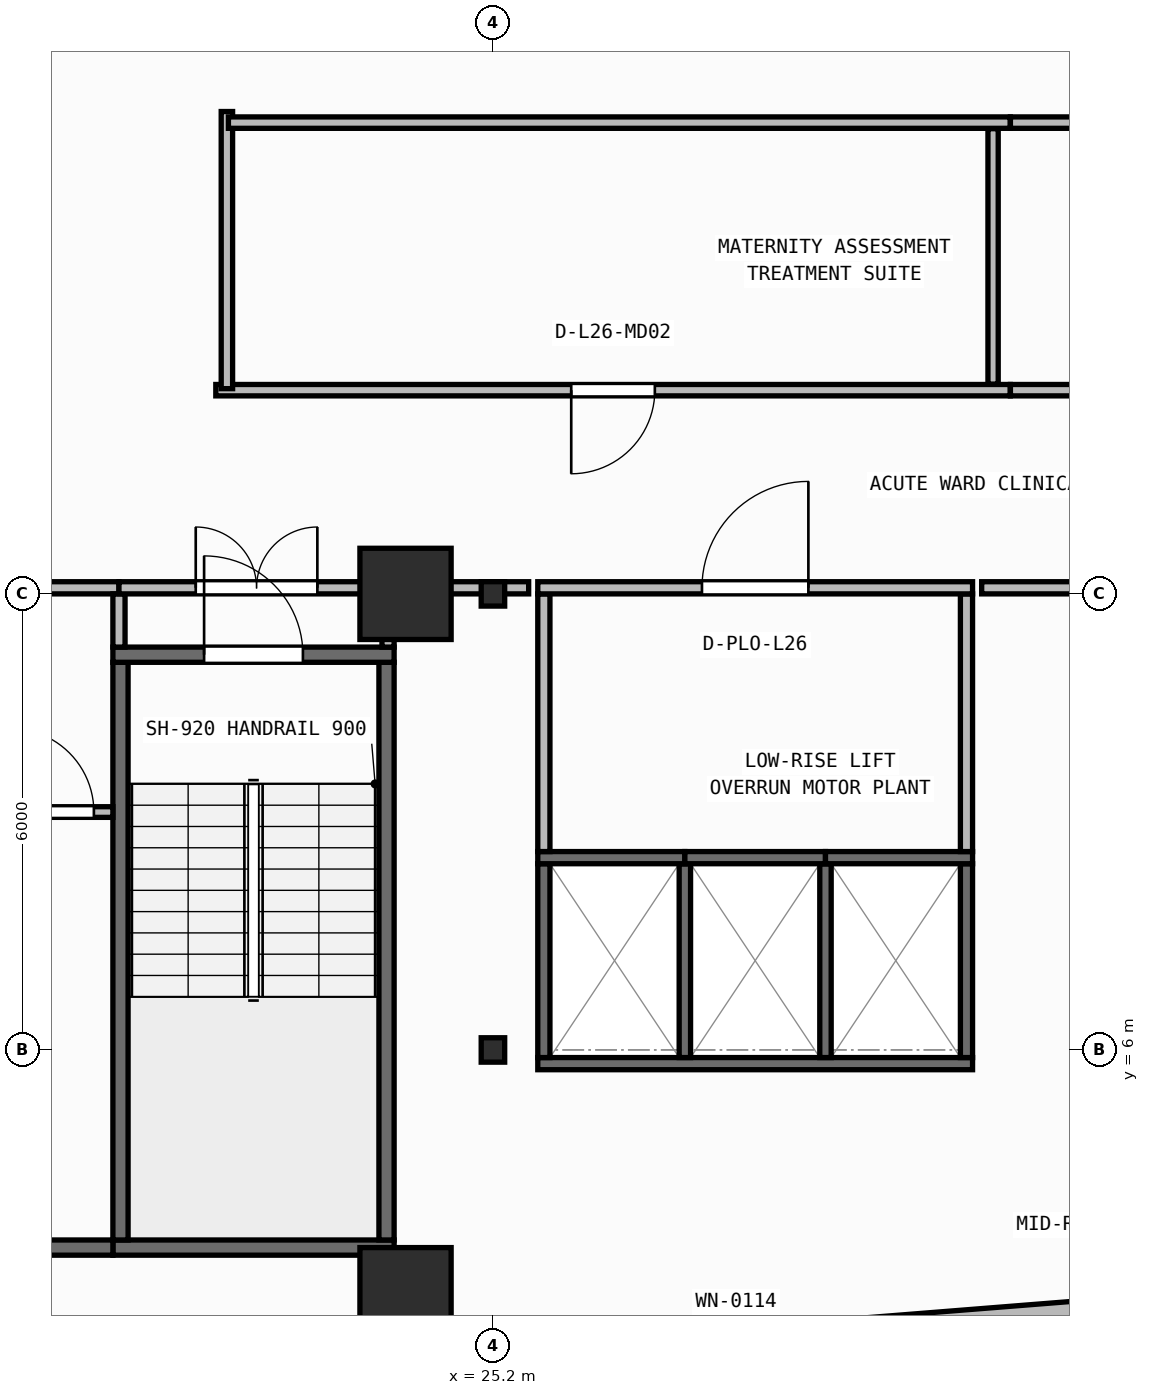
"""IFC4 building model, lengths in metres.
Left out: names, types, materials, properties, quantities, classifications, styles, units other than length and angle.
Written with IfcOpenShell. Run it as: python <this file> out.ifc"""

import sys

from ifc_helpers import new_model, si_unit, direction, frame, frame_2d, origin, origin_2d, place, context, subcontext, project, spatial, rectangle, i_section, extrude, element, fill, save


model = new_model("IFC4")
c1 = context("Model", 3, precision=1e-05, world=origin(), true_north=direction((0.0, 1.0)))
c2 = subcontext(c1, "Body", "Model", "MODEL_VIEW")
j1 = project(units=[si_unit("LENGTHUNIT", "METRE"), si_unit("PLANEANGLEUNIT", "RADIAN")], contexts=[c1])
p1 = place(None, origin())
s1 = spatial("IfcSite", under=j1, at=p1, CompositionType="ELEMENT")
p2 = place(p1, origin())
s2 = spatial("IfcBuilding", under=s1, at=p2, CompositionType="ELEMENT")
p3 = place(p2, frame((0.0, 0.0, 107.3)))
s3 = spatial("IfcBuildingStorey", under=s2, at=p3, CompositionType="ELEMENT", Elevation=107.3)
p4 = place(p3, frame((24.05, 2.8, 0.0), z_axis=(0.0, 0.0, 1.0), x_axis=(1.0, 0.0, 0.0)))
e1 = element("IfcColumn", 1, at=p4, inside=s3, PredefinedType="COLUMN", context=c2, shape_type="SweptSolid", body=[
    extrude(rectangle(XDim=1.2, YDim=1.2, at=origin_2d()), origin(), (0.0, 0.0, 1.0), 3.95),
])
p5 = place(p3, frame((25.2, 6.0, 0.0), z_axis=(0.0, 0.0, 1.0), x_axis=(1.0, 0.0, 0.0)))
e2 = element("IfcColumn", 2, at=p5, inside=s3, PredefinedType="COLUMN", context=c2, shape_type="SweptSolid", body=[
    extrude(i_section(OverallWidth=0.309, OverallDepth=0.321, WebThickness=0.014, FlangeThickness=0.022, FilletRadius=0.017, at=origin_2d()), origin(), (0.0, 0.0, 1.0), 3.95),
])
p6 = place(p3, frame((24.05, 12.0, 0.0), z_axis=(0.0, 0.0, 1.0), x_axis=(1.0, 0.0, 0.0)))
e3 = element("IfcColumn", 3, at=p6, inside=s3, PredefinedType="COLUMN", context=c2, shape_type="SweptSolid", body=[
    extrude(rectangle(XDim=1.2, YDim=1.2, at=origin_2d()), origin(), (0.0, 0.0, 1.0), 3.95),
])
p7 = place(p3, frame((25.2, 12.0, 0.0), z_axis=(0.0, 0.0, 1.0), x_axis=(1.0, 0.0, 0.0)))
e4 = element("IfcColumn", 4, at=p7, inside=s3, PredefinedType="COLUMN", context=c2, shape_type="SweptSolid", body=[
    extrude(i_section(OverallWidth=0.309, OverallDepth=0.321, WebThickness=0.014, FlangeThickness=0.022, FilletRadius=0.017, at=origin_2d()), origin(), (0.0, 0.0, 1.0), 3.95),
])
p8 = place(p3, frame((2.76, 0.173, 0.0), z_axis=(0.0, 0.0, 1.0), x_axis=(0.996857931723, 0.079210251617, 0.0)))
e5 = element("IfcWall", 5, at=p8, inside=s3, PredefinedType="STANDARD", context=c2, shape_type="SweptSolid", body=[
    extrude(rectangle(XDim=51.442, YDim=0.26, at=frame_2d((25.721, 0.0))), origin(), (0.0, 0.0, 1.0), 3.71),
])
p9 = place(p8, frame((24.521, 0.0, 0.9)))
e6 = element("IfcOpeningElement", 6, at=p9, cuts=e5, PredefinedType="OPENING", context=c2, shape_type="SweptSolid", body=[
    extrude(rectangle(XDim=2.4, YDim=1.65, at=frame_2d((1.2, 0.825))), frame((0.0, 0.14, 0.0), z_axis=(0.0, -1.0, 0.0), x_axis=(1.0, 0.0, 0.0)), (0.0, 0.0, 1.0), 0.28),
])
p10 = place(p3, frame((20.2, 3.4, 0.0), z_axis=(0.0, 0.0, 1.0), x_axis=(1.0, 0.0, 0.0)))
e7 = element("IfcWall", 7, at=p10, inside=s3, PredefinedType="SHEAR", context=c2, shape_type="SweptSolid", body=[
    extrude(rectangle(XDim=3.7, YDim=0.2, at=frame_2d((1.85, 0.0))), origin(), (0.0, 0.0, 1.0), 3.71),
])
for number, where, z_axis, x_axis in (
    (8, (20.3, 3.5, 0.0), (0.0, 0.0, 1.0), (0.0, 1.0, 0.0)),
    (9, (23.8, 3.5, 0.0), (0.0, 0.0, 1.0), (0.0, 1.0, 0.0)),
):
    element("IfcWall", number, at=place(p3, frame(where, z_axis=z_axis, x_axis=x_axis)), inside=s3, PredefinedType="SHEAR", context=c2, shape_type="SweptSolid", body=[
        extrude(rectangle(XDim=7.6, YDim=0.2, at=frame_2d((3.8, 0.0))), origin(), (0.0, 0.0, 1.0), 3.71),
    ])
p11 = place(p3, frame((20.2, 11.2, 0.0), z_axis=(0.0, 0.0, 1.0), x_axis=(1.0, 0.0, 0.0)))
e10 = element("IfcWall", 10, at=p11, inside=s3, PredefinedType="SHEAR", context=c2, shape_type="SweptSolid", body=[
    extrude(rectangle(XDim=3.7, YDim=0.2, at=frame_2d((1.85, 0.0))), origin(), (0.0, 0.0, 1.0), 3.71),
])
p12 = place(p11, frame((1.2, 0.0, 0.0)))
e11 = element("IfcOpeningElement", 11, at=p12, cuts=e10, PredefinedType="OPENING", context=c2, shape_type="SweptSolid", body=[
    extrude(rectangle(XDim=1.3, YDim=2.15, at=frame_2d((0.65, 1.075))), frame((0.0, 0.11, 0.0), z_axis=(0.0, -1.0, 0.0), x_axis=(1.0, 0.0, 0.0)), (0.0, 0.0, 1.0), 0.22),
])
p13 = place(p3, frame((6.5, 3.4, 0.0), z_axis=(0.0, 0.0, 1.0), x_axis=(1.0, 0.0, 0.0)))
e12 = element("IfcWall", 12, at=p13, inside=s3, PredefinedType="SHEAR", context=c2, shape_type="SweptSolid", body=[
    extrude(rectangle(XDim=13.7, YDim=0.2, at=frame_2d((6.85, 0.0))), origin(), (0.0, 0.0, 1.0), 3.71),
])
p14 = place(p3, frame((25.79, 5.82, 0.0), z_axis=(0.0, 0.0, 1.0), x_axis=(1.0, 0.0, 0.0)))
e13 = element("IfcWall", 13, at=p14, inside=s3, PredefinedType="SHEAR", context=c2, shape_type="SweptSolid", body=[
    extrude(rectangle(XDim=5.72, YDim=0.16, at=frame_2d((2.86, 0.0))), origin(), (0.0, 0.0, 1.0), 3.71),
])
for number, where, z_axis, x_axis in (
    (14, (25.87, 5.9, 0.0), (0.0, 0.0, 1.0), (0.0, 1.0, 0.0)),
    (15, (31.43, 5.9, 0.0), (0.0, 0.0, 1.0), (0.0, 1.0, 0.0)),
):
    element("IfcWall", number, at=place(p3, frame(where, z_axis=z_axis, x_axis=x_axis)), inside=s3, PredefinedType="SHEAR", context=c2, shape_type="SweptSolid", body=[
        extrude(rectangle(XDim=2.55, YDim=0.16, at=frame_2d((1.275, 0.0))), origin(), (0.0, 0.0, 1.0), 3.71),
    ])
for number, where, z_axis, x_axis in (
    (16, (27.725, 5.9, 0.0), (0.0, 0.0, 1.0), (0.0, 1.0, 0.0)),
    (17, (29.575, 5.9, 0.0), (0.0, 0.0, 1.0), (0.0, 1.0, 0.0)),
):
    element("IfcWall", number, at=place(p3, frame(where, z_axis=z_axis, x_axis=x_axis)), inside=s3, PredefinedType="SHEAR", context=c2, shape_type="SweptSolid", body=[
        extrude(rectangle(XDim=2.55, YDim=0.15, at=frame_2d((1.275, 0.0))), origin(), (0.0, 0.0, 1.0), 3.71),
    ])
p15 = place(p3, frame((25.79, 8.53, 0.0), z_axis=(0.0, 0.0, 1.0), x_axis=(1.0, 0.0, 0.0)))
e18 = element("IfcWall", 18, at=p15, inside=s3, PredefinedType="SHEAR", context=c2, shape_type="SweptSolid", body=[
    extrude(rectangle(XDim=1.935, YDim=0.16, at=frame_2d((0.968, 0.0))), origin(), (0.0, 0.0, 1.0), 3.71),
])
p16 = place(p3, frame((27.725, 8.53, 0.0), z_axis=(0.0, 0.0, 1.0), x_axis=(1.0, 0.0, 0.0)))
e19 = element("IfcWall", 19, at=p16, inside=s3, PredefinedType="SHEAR", context=c2, shape_type="SweptSolid", body=[
    extrude(rectangle(XDim=1.85, YDim=0.16, at=frame_2d((0.925, 0.0))), origin(), (0.0, 0.0, 1.0), 3.71),
])
p17 = place(p3, frame((29.575, 8.53, 0.0), z_axis=(0.0, 0.0, 1.0), x_axis=(1.0, 0.0, 0.0)))
e20 = element("IfcWall", 20, at=p17, inside=s3, PredefinedType="SHEAR", context=c2, shape_type="SweptSolid", body=[
    extrude(rectangle(XDim=1.935, YDim=0.16, at=frame_2d((0.968, 0.0))), origin(), (0.0, 0.0, 1.0), 3.71),
])
p18 = place(p3, frame((18.61, 9.13, 0.0), z_axis=(0.0, 0.0, 1.0), x_axis=(1.0, 0.0, 0.0)))
e21 = element("IfcWall", 21, at=p18, inside=s3, PredefinedType="PARTITIONING", context=c2, shape_type="SweptSolid", body=[
    extrude(rectangle(XDim=1.59, YDim=0.14, at=frame_2d((0.795, 0.0))), origin(), (0.0, 0.0, 1.0), 3.71),
])
p19 = place(p18, frame((0.24, 0.0, 0.0)))
e22 = element("IfcOpeningElement", 22, at=p19, cuts=e21, PredefinedType="OPENING", context=c2, shape_type="SweptSolid", body=[
    extrude(rectangle(XDim=1.1, YDim=2.1, at=frame_2d((0.55, 1.05))), frame((0.0, 0.08, 0.0), z_axis=(0.0, -1.0, 0.0), x_axis=(1.0, 0.0, 0.0)), (0.0, 0.0, 1.0), 0.16),
])
p20 = place(p3, frame((12.58, 12.08, 0.0), z_axis=(0.0, 0.0, 1.0), x_axis=(1.0, 0.0, 0.0)))
e23 = element("IfcWall", 23, at=p20, inside=s3, PredefinedType="PARTITIONING", context=c2, shape_type="SweptSolid", body=[
    extrude(rectangle(XDim=7.7, YDim=0.16, at=frame_2d((3.85, 0.0))), origin(), (0.0, 0.0, 1.0), 3.083),
])
p21 = place(p20, frame((3.05, 0.0, 0.0)))
e24 = element("IfcOpeningElement", 24, at=p21, cuts=e23, PredefinedType="OPENING", context=c2, shape_type="SweptSolid", body=[
    extrude(rectangle(XDim=1.6, YDim=2.05, at=frame_2d((0.8, 1.025))), frame((0.0, 0.09, 0.0), z_axis=(0.0, -1.0, 0.0), x_axis=(1.0, 0.0, 0.0)), (0.0, 0.0, 1.0), 0.18),
])
p22 = place(p3, frame((20.28, 11.3, 0.0), z_axis=(0.0, 0.0, 1.0), x_axis=(0.0, 1.0, 0.0)))
e25 = element("IfcWall", 25, at=p22, inside=s3, PredefinedType="PARTITIONING", context=c2, shape_type="SweptSolid", body=[
    extrude(rectangle(XDim=0.7, YDim=0.16, at=frame_2d((0.35, 0.0))), origin(), (0.0, 0.0, 1.0), 3.71),
])
p23 = place(p3, frame((20.28, 12.08, 0.0), z_axis=(0.0, 0.0, 1.0), x_axis=(1.0, 0.0, 0.0)))
e26 = element("IfcWall", 26, at=p23, inside=s3, PredefinedType="PARTITIONING", context=c2, shape_type="SweptSolid", body=[
    extrude(rectangle(XDim=3.62, YDim=0.16, at=frame_2d((1.81, 0.0))), origin(), (0.0, 0.0, 1.0), 3.083),
])
p24 = place(p23, frame((1.01, 0.0, 0.0)))
e27 = element("IfcOpeningElement", 27, at=p24, cuts=e26, PredefinedType="OPENING", context=c2, shape_type="SweptSolid", body=[
    extrude(rectangle(XDim=1.6, YDim=2.05, at=frame_2d((0.8, 1.025))), frame((0.0, 0.09, 0.0), z_axis=(0.0, -1.0, 0.0), x_axis=(1.0, 0.0, 0.0)), (0.0, 0.0, 1.0), 0.18),
])
p25 = place(p3, frame((23.82, 11.3, 0.0), z_axis=(0.0, 0.0, 1.0), x_axis=(0.0, 1.0, 0.0)))
e28 = element("IfcWall", 28, at=p25, inside=s3, PredefinedType="PARTITIONING", context=c2, shape_type="SweptSolid", body=[
    extrude(rectangle(XDim=0.7, YDim=0.16, at=frame_2d((0.35, 0.0))), origin(), (0.0, 0.0, 1.0), 3.71),
])
for number, where, z_axis, x_axis in (
    (29, (25.87, 8.61, 0.0), (0.0, 0.0, 1.0), (0.0, 1.0, 0.0)),
    (30, (31.43, 8.61, 0.0), (0.0, 0.0, 1.0), (0.0, 1.0, 0.0)),
):
    element("IfcWall", number, at=place(p3, frame(where, z_axis=z_axis, x_axis=x_axis)), inside=s3, PredefinedType="PARTITIONING", context=c2, shape_type="SweptSolid", body=[
        extrude(rectangle(XDim=3.39, YDim=0.16, at=frame_2d((1.695, 0.0))), origin(), (0.0, 0.0, 1.0), 3.71),
    ])
p26 = place(p3, frame((25.79, 12.08, 0.0), z_axis=(0.0, 0.0, 1.0), x_axis=(1.0, 0.0, 0.0)))
e31 = element("IfcWall", 31, at=p26, inside=s3, PredefinedType="PARTITIONING", context=c2, shape_type="SweptSolid", body=[
    extrude(rectangle(XDim=5.72, YDim=0.16, at=frame_2d((2.86, 0.0))), origin(), (0.0, 0.0, 1.0), 3.083),
])
p27 = place(p26, frame((2.16, 0.0, 0.0)))
e32 = element("IfcOpeningElement", 32, at=p27, cuts=e31, PredefinedType="OPENING", context=c2, shape_type="SweptSolid", body=[
    extrude(rectangle(XDim=1.4, YDim=2.15, at=frame_2d((0.7, 1.075))), frame((0.0, 0.09, 0.0), z_axis=(0.0, -1.0, 0.0), x_axis=(1.0, 0.0, 0.0)), (0.0, 0.0, 1.0), 0.18),
])
p28 = place(p3, frame((32.006, 14.68, 0.0), z_axis=(0.0, 0.0, 1.0), x_axis=(-1.0, 0.0, 0.0)))
e33 = element("IfcWall", 33, at=p28, inside=s3, PredefinedType="PARTITIONING", context=c2, shape_type="SweptSolid", body=[
    extrude(rectangle(XDim=10.452, YDim=0.15, at=frame_2d((5.226, 0.0))), origin(), (0.0, 0.0, 1.0), 3.71),
])
p29 = place(p28, frame((4.676, 0.0, 0.0)))
e34 = element("IfcOpeningElement", 34, at=p29, cuts=e33, PredefinedType="OPENING", context=c2, shape_type="SweptSolid", body=[
    extrude(rectangle(XDim=1.1, YDim=2.1, at=frame_2d((0.55, 1.05))), frame((0.0, 0.085, 0.0), z_axis=(0.0, -1.0, 0.0), x_axis=(1.0, 0.0, 0.0)), (0.0, 0.0, 1.0), 0.17),
])
p30 = place(p3, frame((43.726, 14.68, 0.0), z_axis=(0.0, 0.0, 1.0), x_axis=(-1.0, 0.0, 0.0)))
e35 = element("IfcWall", 35, at=p30, inside=s3, PredefinedType="PARTITIONING", context=c2, shape_type="SweptSolid", body=[
    extrude(rectangle(XDim=11.718, YDim=0.15, at=frame_2d((5.859, 0.0))), origin(), (0.0, 0.0, 1.0), 3.71),
])
p31 = place(p30, frame((5.309, 0.0, 0.0)))
e36 = element("IfcOpeningElement", 36, at=p31, cuts=e35, PredefinedType="OPENING", context=c2, shape_type="SweptSolid", body=[
    extrude(rectangle(XDim=1.1, YDim=2.1, at=frame_2d((0.55, 1.05))), frame((0.0, 0.085, 0.0), z_axis=(0.0, -1.0, 0.0), x_axis=(1.0, 0.0, 0.0)), (0.0, 0.0, 1.0), 0.17),
])
p32 = place(p3, frame((21.7, 14.7, 0.0), z_axis=(0.0, 0.0, 1.0), x_axis=(0.0, 1.0, 0.0)))
e37 = element("IfcWall", 37, at=p32, inside=s3, PredefinedType="PARTITIONING", context=c2, shape_type="SweptSolid", body=[
    extrude(rectangle(XDim=3.646, YDim=0.15, at=frame_2d((1.823, 0.0))), origin(), (0.0, 0.0, 1.0), 3.71),
])
p33 = place(p3, frame((21.72, 18.2, 0.0), z_axis=(0.0, 0.0, 1.0), x_axis=(1.0, 0.0, 0.0)))
e38 = element("IfcWall", 38, at=p33, inside=s3, PredefinedType="PARTITIONING", context=c2, shape_type="SweptSolid", body=[
    extrude(rectangle(XDim=10.286, YDim=0.15, at=frame_2d((5.143, 0.0))), origin(), (0.0, 0.0, 1.0), 3.71),
])
p34 = place(p3, frame((32.008, 18.2, 0.0), z_axis=(0.0, 0.0, 1.0), x_axis=(1.0, 0.0, 0.0)))
e39 = element("IfcWall", 39, at=p34, inside=s3, PredefinedType="PARTITIONING", context=c2, shape_type="SweptSolid", body=[
    extrude(rectangle(XDim=11.718, YDim=0.15, at=frame_2d((5.859, 0.0))), origin(), (0.0, 0.0, 1.0), 3.71),
])
p35 = place(p3, frame((31.78, 14.76, 0.0), z_axis=(0.0, 0.0, 1.0), x_axis=(0.0, 1.0, 0.0)))
e40 = element("IfcWall", 40, at=p35, inside=s3, PredefinedType="PARTITIONING", context=c2, shape_type="SweptSolid", body=[
    extrude(rectangle(XDim=3.36, YDim=0.135, at=frame_2d((1.68, 0.0))), origin(), (0.0, 0.0, 1.0), 3.71),
])
p36 = place(p3, frame((24.02, 12.08, 0.0), z_axis=(0.0, 0.0, 1.0), x_axis=(1.0, 0.0, 0.0)))
e41 = element("IfcWall", 41, at=p36, inside=s3, PredefinedType="PARTITIONING", context=c2, shape_type="SweptSolid", body=[
    extrude(rectangle(XDim=1.65, YDim=0.16, at=frame_2d((0.825, 0.0))), origin(), (0.0, 0.0, 1.0), 3.083),
])
p37 = place(p3, frame((31.63, 12.08, 0.0), z_axis=(0.0, 0.0, 1.0), x_axis=(1.0, 0.0, 0.0)))
e42 = element("IfcWall", 42, at=p37, inside=s3, PredefinedType="PARTITIONING", context=c2, shape_type="SweptSolid", body=[
    extrude(rectangle(XDim=2.44, YDim=0.16, at=frame_2d((1.22, 0.0))), origin(), (0.0, 0.0, 1.0), 3.083),
])
p38 = place(p12, origin())
e43 = element("IfcDoor", 43, at=p38, inside=s3, OperationType="SINGLE_SWING_LEFT", PredefinedType="DOOR", context=c2, shape_type="SweptSolid", body=[
    extrude(rectangle(XDim=1.3, YDim=2.15, at=frame_2d((0.65, 1.075))), frame((0.0, 0.025, 0.0), z_axis=(0.0, -1.0, 0.0), x_axis=(1.0, 0.0, 0.0)), (0.0, 0.0, 1.0), 0.05),
])
fill(e11, e43)
p39 = place(p19, origin())
e44 = element("IfcDoor", 44, at=p39, inside=s3, OperationType="SINGLE_SWING_LEFT", PredefinedType="DOOR", context=c2, shape_type="SweptSolid", body=[
    extrude(rectangle(XDim=1.1, YDim=2.1, at=frame_2d((0.55, 1.05))), frame((0.0, 0.025, 0.0), z_axis=(0.0, -1.0, 0.0), x_axis=(1.0, 0.0, 0.0)), (0.0, 0.0, 1.0), 0.05),
])
fill(e22, e44)
p40 = place(p24, origin())
e45 = element("IfcDoor", 45, at=p40, inside=s3, OperationType="DOUBLE_DOOR_SINGLE_SWING", PredefinedType="DOOR", context=c2, shape_type="SweptSolid", body=[
    extrude(rectangle(XDim=1.6, YDim=2.05, at=frame_2d((0.8, 1.025))), frame((0.0, 0.025, 0.0), z_axis=(0.0, -1.0, 0.0), x_axis=(1.0, 0.0, 0.0)), (0.0, 0.0, 1.0), 0.05),
])
fill(e27, e45)
p41 = place(p27, origin())
e46 = element("IfcDoor", 46, at=p41, inside=s3, OperationType="SINGLE_SWING_RIGHT", PredefinedType="DOOR", context=c2, shape_type="SweptSolid", body=[
    extrude(rectangle(XDim=1.4, YDim=2.15, at=frame_2d((0.7, 1.075))), frame((0.0, 0.025, 0.0), z_axis=(0.0, -1.0, 0.0), x_axis=(1.0, 0.0, 0.0)), (0.0, 0.0, 1.0), 0.05),
])
fill(e32, e46)
p42 = place(p29, origin())
e47 = element("IfcDoor", 47, at=p42, inside=s3, OperationType="SINGLE_SWING_RIGHT", PredefinedType="DOOR", context=c2, shape_type="SweptSolid", body=[
    extrude(rectangle(XDim=1.1, YDim=2.1, at=frame_2d((0.55, 1.05))), frame((0.0, 0.025, 0.0), z_axis=(0.0, -1.0, 0.0), x_axis=(1.0, 0.0, 0.0)), (0.0, 0.0, 1.0), 0.05),
])
fill(e34, e47)
save(model, sys.argv[1])
